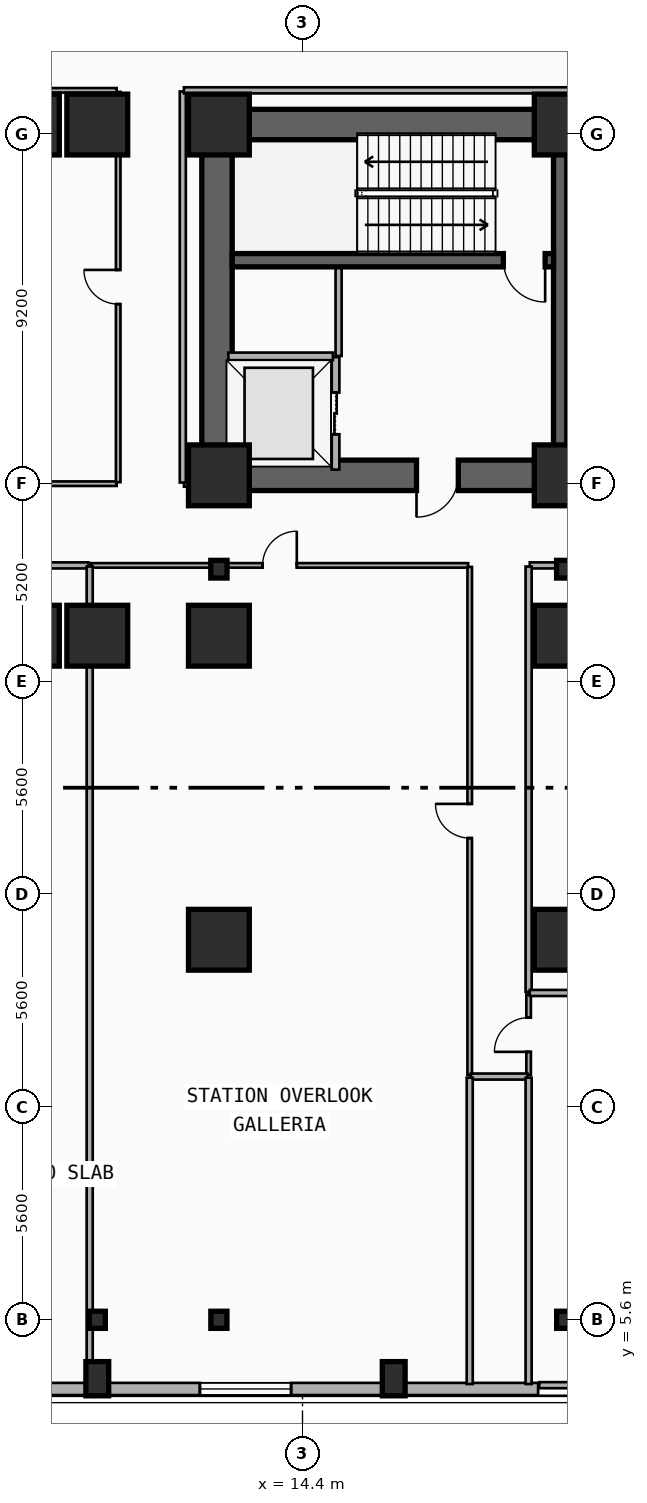
"""IFC4 building model, lengths in metres.
Left out: names, types, materials, properties, quantities, classifications, styles, units other than length and angle.
Written with IfcOpenShell. Run it as: python <this file> out.ifc"""

import sys

from ifc_helpers import new_model, si_unit, direction, frame, frame_2d, origin, origin_2d, place, context, subcontext, project, spatial, rectangle, i_section, extrude, element, fill, save


model = new_model("IFC4")
c1 = context("Model", 3, precision=1e-05, world=origin(), true_north=direction((0.0, 1.0)))
c2 = subcontext(c1, "Body", "Model", "MODEL_VIEW")
j1 = project(units=[si_unit("LENGTHUNIT", "METRE"), si_unit("PLANEANGLEUNIT", "RADIAN")], contexts=[c1])
p1 = place(None, origin())
s1 = spatial("IfcSite", under=j1, at=p1, CompositionType="ELEMENT")
p2 = place(p1, origin())
s2 = spatial("IfcBuilding", under=s1, at=p2, CompositionType="ELEMENT")
p3 = place(p2, frame((0.0, 0.0, 5.4)))
s3 = spatial("IfcBuildingStorey", under=s2, at=p3, CompositionType="ELEMENT", Elevation=5.4)
p4 = place(p3, frame((12.15, 37.05, 0.0), z_axis=(0.0, 0.0, 1.0), x_axis=(1.0, 0.0, 0.0)))
e1 = element("IfcWall", 1, at=p4, inside=s3, PredefinedType="SHEAR", context=c2, shape_type="SweptSolid", body=[
    extrude(rectangle(XDim=33.23, YDim=0.8, at=frame_2d((16.615, 0.0))), origin(), (0.0, 0.0, 1.0), 5.0),
])
p5 = place(p3, frame((21.18, 27.82, 0.0), z_axis=(0.0, 0.0, 1.0), x_axis=(-1.0, 0.0, 0.0)))
e2 = element("IfcWall", 2, at=p5, inside=s3, PredefinedType="SHEAR", context=c2, shape_type="SweptSolid", body=[
    extrude(rectangle(XDim=9.03, YDim=0.8, at=frame_2d((4.515, 0.0))), origin(), (0.0, 0.0, 1.0), 5.0),
])
p6 = place(p5, frame((2.68, 0.0, 0.0)))
e3 = element("IfcOpeningElement", 3, at=p6, cuts=e2, PredefinedType="OPENING", context=c2, shape_type="SweptSolid", body=[
    extrude(rectangle(XDim=1.1, YDim=2.15, at=frame_2d((0.55, 1.075))), frame((0.0, 0.41, 0.0), z_axis=(0.0, -1.0, 0.0), x_axis=(1.0, 0.0, 0.0)), (0.0, 0.0, 1.0), 0.82),
])
p7 = place(p3, frame((33.15, 27.82, 0.0), z_axis=(0.0, 0.0, 1.0), x_axis=(-1.0, 0.0, 0.0)))
e4 = element("IfcWall", 4, at=p7, inside=s3, PredefinedType="SHEAR", context=c2, shape_type="SweptSolid", body=[
    extrude(rectangle(XDim=11.97, YDim=0.8, at=frame_2d((5.985, 0.0))), origin(), (0.0, 0.0, 1.0), 5.0),
])
p8 = place(p7, frame((6.1, 0.0, 0.0)))
e5 = element("IfcOpeningElement", 5, at=p8, cuts=e4, PredefinedType="OPENING", context=c2, shape_type="SweptSolid", body=[
    extrude(rectangle(XDim=1.6, YDim=2.2, at=frame_2d((0.8, 1.1))), frame((0.0, 0.41, 0.0), z_axis=(0.0, -1.0, 0.0), x_axis=(1.0, 0.0, 0.0)), (0.0, 0.0, 1.0), 0.82),
])
p9 = place(p3, frame((12.15, 28.22, 0.0), z_axis=(0.0, 0.0, 1.0), x_axis=(0.0, 1.0, 0.0)))
e6 = element("IfcWall", 6, at=p9, inside=s3, PredefinedType="SHEAR", context=c2, shape_type="SweptSolid", body=[
    extrude(rectangle(XDim=8.43, YDim=0.8, at=frame_2d((4.215, 0.0))), origin(), (0.0, 0.0, 1.0), 5.0),
])
p10 = place(p3, frame((21.18, 28.22, 0.0), z_axis=(0.0, 0.0, 1.0), x_axis=(0.0, 1.0, 0.0)))
e7 = element("IfcWall", 7, at=p10, inside=s3, PredefinedType="SHEAR", context=c2, shape_type="SweptSolid", body=[
    extrude(rectangle(XDim=8.43, YDim=0.35, at=frame_2d((4.215, 0.0))), origin(), (0.0, 0.0, 1.0), 5.0),
])
p11 = place(p3, frame((21.005, 33.48, 0.0), z_axis=(0.0, 0.0, 1.0), x_axis=(-1.0, 0.0, 0.0)))
e8 = element("IfcWall", 8, at=p11, inside=s3, PredefinedType="SHEAR", context=c2, shape_type="SweptSolid", body=[
    extrude(rectangle(XDim=8.455, YDim=0.35, at=frame_2d((4.228, 0.0))), origin(), (0.0, 0.0, 1.0), 5.0),
])
p12 = place(p11, frame((0.22, 0.0, 0.0)))
e9 = element("IfcOpeningElement", 9, at=p12, cuts=e8, PredefinedType="OPENING", context=c2, shape_type="SweptSolid", body=[
    extrude(rectangle(XDim=1.1, YDim=2.15, at=frame_2d((0.55, 1.075))), frame((0.0, 0.185, 0.0), z_axis=(0.0, -1.0, 0.0), x_axis=(1.0, 0.0, 0.0)), (0.0, 0.0, 1.0), 0.37),
])
for number, where, z_axis, x_axis in (
    (10, (12.2, 27.82, 0.0), (0.0, 0.0, 1.0), (1.0, 0.0, 0.0)),
    (11, (12.2, 37.05, 0.0), (0.0, 0.0, 1.0), (1.0, 0.0, 0.0)),
    (12, (21.3, 27.82, 0.0), (0.0, 0.0, 1.0), (1.0, 0.0, 0.0)),
    (13, (21.3, 37.05, 0.0), (0.0, 0.0, 1.0), (1.0, 0.0, 0.0)),
):
    element("IfcColumn", number, at=place(p3, frame(where, z_axis=z_axis, x_axis=x_axis)), inside=s3, PredefinedType="COLUMN", context=c2, shape_type="SweptSolid", body=[
        extrude(rectangle(XDim=1.6, YDim=1.6, at=origin_2d()), origin(), (0.0, 0.0, 1.0), 5.0),
    ])
for number, where, z_axis, x_axis in (
    (14, (12.2, 25.35, 0.0), (0.0, 0.0, 1.0), (1.0, 0.0, 0.0)),
    (15, (21.3, 25.35, 0.0), (0.0, 0.0, 1.0), (1.0, 0.0, 0.0)),
):
    element("IfcColumn", number, at=place(p3, frame(where, z_axis=z_axis, x_axis=x_axis)), inside=s3, PredefinedType="COLUMN", context=c2, shape_type="SweptSolid", body=[
        extrude(i_section(OverallWidth=0.428, OverallDepth=0.465, WebThickness=0.045, FlangeThickness=0.073, FilletRadius=0.015, at=origin_2d()), origin(), (0.0, 0.0, 1.0), 5.0),
    ])
for number, where, z_axis, x_axis in (
    (16, (7.2, 23.6, 0.0), (0.0, 0.0, 1.0), (1.0, 0.0, 0.0)),
    (17, (7.2, 37.05, 0.0), (0.0, 0.0, 1.0), (1.0, 0.0, 0.0)),
):
    element("IfcColumn", number, at=place(p3, frame(where, z_axis=z_axis, x_axis=x_axis)), inside=s3, PredefinedType="COLUMN", context=c2, shape_type="SweptSolid", body=[
        extrude(rectangle(XDim=1.6, YDim=1.6, at=origin_2d()), origin(), (0.0, 0.0, 1.0), 5.0),
    ])
p13 = place(p3, frame((9.0, 5.6, 0.0), z_axis=(0.0, 0.0, 1.0), x_axis=(1.0, 0.0, 0.0)))
e18 = element("IfcColumn", 18, at=p13, inside=s3, PredefinedType="COLUMN", context=c2, shape_type="SweptSolid", body=[
    extrude(i_section(OverallWidth=0.424, OverallDepth=0.45, WebThickness=0.041, FlangeThickness=0.065, FilletRadius=0.015, at=origin_2d()), origin(), (0.0, 0.0, 1.0), 5.0),
])
for number, where, z_axis, x_axis in (
    (19, (9.0, 23.6, 0.0), (0.0, 0.0, 1.0), (1.0, 0.0, 0.0)),
    (20, (9.0, 37.05, 0.0), (0.0, 0.0, 1.0), (1.0, 0.0, 0.0)),
):
    element("IfcColumn", number, at=place(p3, frame(where, z_axis=z_axis, x_axis=x_axis)), inside=s3, PredefinedType="COLUMN", context=c2, shape_type="SweptSolid", body=[
        extrude(rectangle(XDim=1.6, YDim=1.6, at=origin_2d()), origin(), (0.0, 0.0, 1.0), 5.0),
    ])
p14 = place(p3, frame((12.2, 5.6, 0.0), z_axis=(0.0, 0.0, 1.0), x_axis=(1.0, 0.0, 0.0)))
e21 = element("IfcColumn", 21, at=p14, inside=s3, PredefinedType="COLUMN", context=c2, shape_type="SweptSolid", body=[
    extrude(i_section(OverallWidth=0.424, OverallDepth=0.45, WebThickness=0.041, FlangeThickness=0.065, FilletRadius=0.015, at=origin_2d()), origin(), (0.0, 0.0, 1.0), 5.0),
])
for number, where, z_axis, x_axis in (
    (22, (12.2, 15.6, 0.0), (0.0, 0.0, 1.0), (1.0, 0.0, 0.0)),
    (23, (12.2, 23.6, 0.0), (0.0, 0.0, 1.0), (1.0, 0.0, 0.0)),
):
    element("IfcColumn", number, at=place(p3, frame(where, z_axis=z_axis, x_axis=x_axis)), inside=s3, PredefinedType="COLUMN", context=c2, shape_type="SweptSolid", body=[
        extrude(rectangle(XDim=1.6, YDim=1.6, at=origin_2d()), origin(), (0.0, 0.0, 1.0), 5.0),
    ])
p15 = place(p3, frame((21.3, 5.6, 0.0), z_axis=(0.0, 0.0, 1.0), x_axis=(1.0, 0.0, 0.0)))
e24 = element("IfcColumn", 24, at=p15, inside=s3, PredefinedType="COLUMN", context=c2, shape_type="SweptSolid", body=[
    extrude(i_section(OverallWidth=0.424, OverallDepth=0.45, WebThickness=0.041, FlangeThickness=0.065, FilletRadius=0.015, at=origin_2d()), origin(), (0.0, 0.0, 1.0), 5.0),
])
for number, where, z_axis, x_axis in (
    (25, (21.3, 15.6, 0.0), (0.0, 0.0, 1.0), (1.0, 0.0, 0.0)),
    (26, (21.3, 23.6, 0.0), (0.0, 0.0, 1.0), (1.0, 0.0, 0.0)),
):
    element("IfcColumn", number, at=place(p3, frame(where, z_axis=z_axis, x_axis=x_axis)), inside=s3, PredefinedType="COLUMN", context=c2, shape_type="SweptSolid", body=[
        extrude(rectangle(XDim=1.6, YDim=1.6, at=origin_2d()), origin(), (0.0, 0.0, 1.0), 5.0),
    ])
for number, where, z_axis, x_axis in (
    (27, (9.0, 4.05, 0.0), (0.0, 0.0, 1.0), (1.0, 0.0, 0.0)),
    (28, (16.8, 4.05, 0.0), (0.0, 0.0, 1.0), (1.0, 0.0, 0.0)),
):
    element("IfcColumn", number, at=place(p3, frame(where, z_axis=z_axis, x_axis=x_axis)), inside=s3, PredefinedType="PILASTER", context=c2, shape_type="SweptSolid", body=[
        extrude(rectangle(XDim=0.6, YDim=0.9, at=origin_2d()), origin(), (0.0, 0.0, 1.0), 5.0),
    ])
p16 = place(p3, frame((20.6, 3.78, 0.0), z_axis=(0.0, 0.0, 1.0), x_axis=(-1.0, 0.0, 0.0)))
e29 = element("IfcWall", 29, at=p16, inside=s3, PredefinedType="SOLIDWALL", context=c2, shape_type="SweptSolid", body=[
    extrude(rectangle(XDim=17.0, YDim=0.32, at=frame_2d((8.5, 0.0))), origin(), (0.0, 0.0, 1.0), 4.03),
])
p17 = place(p16, frame((6.5, 0.0, 0.9)))
e30 = element("IfcOpeningElement", 30, at=p17, cuts=e29, PredefinedType="OPENING", context=c2, shape_type="SweptSolid", body=[
    extrude(rectangle(XDim=2.4, YDim=1.8, at=frame_2d((1.2, 0.9))), frame((0.0, 0.17, 0.0), z_axis=(0.0, -1.0, 0.0), x_axis=(1.0, 0.0, 0.0)), (0.0, 0.0, 1.0), 0.34),
])
p18 = place(p3, frame((15.27, 27.97, 0.0), z_axis=(0.0, 0.0, 1.0), x_axis=(0.0, 1.0, 0.0)))
e31 = element("IfcWall", 31, at=p18, inside=s3, PredefinedType="PARTITIONING", context=c2, shape_type="SweptSolid", body=[
    extrude(rectangle(XDim=2.96, YDim=0.2, at=frame_2d((1.48, 0.0))), origin(), (0.0, 0.0, 1.0), 3.672),
])
p19 = place(p18, frame((0.93, 0.0, 0.0)))
e32 = element("IfcOpeningElement", 32, at=p19, cuts=e31, PredefinedType="OPENING", context=c2, shape_type="SweptSolid", body=[
    extrude(rectangle(XDim=1.1, YDim=2.15, at=frame_2d((0.55, 1.075))), frame((0.0, 0.11, 0.0), z_axis=(0.0, -1.0, 0.0), x_axis=(1.0, 0.0, 0.0)), (0.0, 0.0, 1.0), 0.22),
])
p20 = place(p3, frame((12.45, 30.95, 0.0), z_axis=(0.0, 0.0, 1.0), x_axis=(1.0, 0.0, 0.0)))
e33 = element("IfcWall", 33, at=p20, inside=s3, PredefinedType="PARTITIONING", context=c2, shape_type="SweptSolid", body=[
    extrude(rectangle(XDim=2.75, YDim=0.2, at=frame_2d((1.375, 0.0))), origin(), (0.0, 0.0, 1.0), 3.672),
])
p21 = place(p3, frame((0.28, 27.6, 0.0), z_axis=(0.0, 0.0, 1.0), x_axis=(1.0, 0.0, 0.0)))
e34 = element("IfcWall", 34, at=p21, inside=s3, PredefinedType="PARTITIONING", context=c2, shape_type="SweptSolid", body=[
    extrude(rectangle(XDim=9.23, YDim=0.12, at=frame_2d((4.615, 0.0))), origin(), (0.0, 0.0, 1.0), 4.7),
])
p22 = place(p21, frame((4.165, 0.0, 0.0)))
e35 = element("IfcOpeningElement", 35, at=p22, cuts=e34, PredefinedType="OPENING", context=c2, shape_type="SweptSolid", body=[
    extrude(rectangle(XDim=0.9, YDim=2.1, at=frame_2d((0.45, 1.05))), frame((0.0, 0.07, 0.0), z_axis=(0.0, -1.0, 0.0), x_axis=(1.0, 0.0, 0.0)), (0.0, 0.0, 1.0), 0.14),
])
p23 = place(p3, frame((8.84, 25.45, 0.0), z_axis=(0.0, 0.0, 1.0), x_axis=(1.0, 0.0, 0.0)))
e36 = element("IfcWall", 36, at=p23, inside=s3, PredefinedType="PARTITIONING", context=c2, shape_type="SweptSolid", body=[
    extrude(rectangle(XDim=9.92, YDim=0.12, at=frame_2d((4.96, 0.0))), origin(), (0.0, 0.0, 1.0), 3.672),
])
p24 = place(p23, frame((4.51, 0.0, 0.0)))
e37 = element("IfcOpeningElement", 37, at=p24, cuts=e36, PredefinedType="OPENING", context=c2, shape_type="SweptSolid", body=[
    extrude(rectangle(XDim=0.9, YDim=2.1, at=frame_2d((0.45, 1.05))), frame((0.0, 0.07, 0.0), z_axis=(0.0, -1.0, 0.0), x_axis=(1.0, 0.0, 0.0)), (0.0, 0.0, 1.0), 0.14),
])
p25 = place(p3, frame((9.55, 27.64, 0.0), z_axis=(0.0, 0.0, 1.0), x_axis=(0.0, 1.0, 0.0)))
e38 = element("IfcWall", 38, at=p25, inside=s3, PredefinedType="PARTITIONING", context=c2, shape_type="SweptSolid", body=[
    extrude(rectangle(XDim=10.27, YDim=0.12, at=frame_2d((5.135, 0.0))), origin(), (0.0, 0.0, 1.0), 4.7),
])
p26 = place(p25, frame((4.685, 0.0, 0.0)))
e39 = element("IfcOpeningElement", 39, at=p26, cuts=e38, PredefinedType="OPENING", context=c2, shape_type="SweptSolid", body=[
    extrude(rectangle(XDim=0.9, YDim=2.1, at=frame_2d((0.45, 1.05))), frame((0.0, 0.07, 0.0), z_axis=(0.0, -1.0, 0.0), x_axis=(1.0, 0.0, 0.0)), (0.0, 0.0, 1.0), 0.14),
])
p27 = place(p3, frame((1.84, 37.95, 0.0), z_axis=(0.0, 0.0, 1.0), x_axis=(1.0, 0.0, 0.0)))
e40 = element("IfcWall", 40, at=p27, inside=s3, PredefinedType="PARTITIONING", context=c2, shape_type="SweptSolid", body=[
    extrude(rectangle(XDim=7.67, YDim=0.12, at=frame_2d((3.835, 0.0))), origin(), (0.0, 0.0, 1.0), 4.7),
])
p28 = place(p27, frame((3.385, 0.0, 0.0)))
e41 = element("IfcOpeningElement", 41, at=p28, cuts=e40, PredefinedType="OPENING", context=c2, shape_type="SweptSolid", body=[
    extrude(rectangle(XDim=0.9, YDim=2.1, at=frame_2d((0.45, 1.05))), frame((0.0, 0.07, 0.0), z_axis=(0.0, -1.0, 0.0), x_axis=(1.0, 0.0, 0.0)), (0.0, 0.0, 1.0), 0.14),
])
p29 = place(p3, frame((18.8, 12.04, 0.0), z_axis=(0.0, 0.0, 1.0), x_axis=(0.0, 1.0, 0.0)))
e42 = element("IfcWall", 42, at=p29, inside=s3, PredefinedType="PARTITIONING", context=c2, shape_type="SweptSolid", body=[
    extrude(rectangle(XDim=13.37, YDim=0.12, at=frame_2d((6.685, 0.0))), origin(), (0.0, 0.0, 1.0), 3.672),
])
p30 = place(p29, frame((6.235, 0.0, 0.0)))
e43 = element("IfcOpeningElement", 43, at=p30, cuts=e42, PredefinedType="OPENING", context=c2, shape_type="SweptSolid", body=[
    extrude(rectangle(XDim=0.9, YDim=2.1, at=frame_2d((0.45, 1.05))), frame((0.0, 0.07, 0.0), z_axis=(0.0, -1.0, 0.0), x_axis=(1.0, 0.0, 0.0)), (0.0, 0.0, 1.0), 0.14),
])
p31 = place(p3, frame((20.35, 12.04, 0.0), z_axis=(0.0, 0.0, 1.0), x_axis=(0.0, 1.0, 0.0)))
e44 = element("IfcWall", 44, at=p31, inside=s3, PredefinedType="PARTITIONING", context=c2, shape_type="SweptSolid", body=[
    extrude(rectangle(XDim=2.12, YDim=0.12, at=frame_2d((1.06, 0.0))), origin(), (0.0, 0.0, 1.0), 4.32),
])
p32 = place(p31, frame((0.61, 0.0, 0.0)))
e45 = element("IfcOpeningElement", 45, at=p32, cuts=e44, PredefinedType="OPENING", context=c2, shape_type="SweptSolid", body=[
    extrude(rectangle(XDim=0.9, YDim=2.1, at=frame_2d((0.45, 1.05))), frame((0.0, 0.07, 0.0), z_axis=(0.0, -1.0, 0.0), x_axis=(1.0, 0.0, 0.0)), (0.0, 0.0, 1.0), 0.14),
])
p33 = place(p3, frame((15.35, 30.96, 0.0), z_axis=(0.0, 0.0, 1.0), x_axis=(0.0, 1.0, 0.0)))
e46 = element("IfcWall", 46, at=p33, inside=s3, PredefinedType="PARTITIONING", context=c2, shape_type="SweptSolid", body=[
    extrude(rectangle(XDim=2.31, YDim=0.16, at=frame_2d((1.155, 0.0))), origin(), (0.0, 0.0, 1.0), 4.7),
])
p34 = place(p3, frame((0.31, 25.45, 0.0), z_axis=(0.0, 0.0, 1.0), x_axis=(1.0, 0.0, 0.0)))
e47 = element("IfcWall", 47, at=p34, inside=s3, PredefinedType="PARTITIONING", context=c2, shape_type="SweptSolid", body=[
    extrude(rectangle(XDim=8.46, YDim=0.16, at=frame_2d((4.23, 0.0))), origin(), (0.0, 0.0, 1.0), 4.7),
])
p35 = place(p3, frame((20.38, 25.45, 0.0), z_axis=(0.0, 0.0, 1.0), x_axis=(1.0, 0.0, 0.0)))
e48 = element("IfcWall", 48, at=p35, inside=s3, PredefinedType="PARTITIONING", context=c2, shape_type="SweptSolid", body=[
    extrude(rectangle(XDim=15.94, YDim=0.16, at=frame_2d((7.97, 0.0))), origin(), (0.0, 0.0, 1.0), 3.672),
])
p36 = place(p3, frame((11.28, 27.6, 0.0), z_axis=(0.0, 0.0, 1.0), x_axis=(1.0, 0.0, 0.0)))
e49 = element("IfcWall", 49, at=p36, inside=s3, PredefinedType="PARTITIONING", context=c2, shape_type="SweptSolid", body=[
    extrude(rectangle(XDim=0.84, YDim=0.16, at=frame_2d((0.42, 0.0))), origin(), (0.0, 0.0, 1.0), 3.672),
])
p37 = place(p3, frame((11.25, 27.63, 0.0), z_axis=(0.0, 0.0, 1.0), x_axis=(0.0, 1.0, 0.0)))
e50 = element("IfcWall", 50, at=p37, inside=s3, PredefinedType="PARTITIONING", context=c2, shape_type="SweptSolid", body=[
    extrude(rectangle(XDim=10.29, YDim=0.16, at=frame_2d((5.145, 0.0))), origin(), (0.0, 0.0, 1.0), 4.7),
])
p38 = place(p3, frame((11.28, 37.95, 0.0), z_axis=(0.0, 0.0, 1.0), x_axis=(1.0, 0.0, 0.0)))
e51 = element("IfcWall", 51, at=p38, inside=s3, PredefinedType="PARTITIONING", context=c2, shape_type="SweptSolid", body=[
    extrude(rectangle(XDim=35.04, YDim=0.16, at=frame_2d((17.52, 0.0))), origin(), (0.0, 0.0, 1.0), 4.03),
])
p39 = place(p3, frame((18.83, 12.0, 0.0), z_axis=(0.0, 0.0, 1.0), x_axis=(1.0, 0.0, 0.0)))
e52 = element("IfcWall", 52, at=p39, inside=s3, PredefinedType="PARTITIONING", context=c2, shape_type="SweptSolid", body=[
    extrude(rectangle(XDim=1.49, YDim=0.16, at=frame_2d((0.745, 0.0))), origin(), (0.0, 0.0, 1.0), 4.32),
])
p40 = place(p3, frame((20.35, 14.23, 0.0), z_axis=(0.0, 0.0, 1.0), x_axis=(0.0, 1.0, 0.0)))
e53 = element("IfcWall", 53, at=p40, inside=s3, PredefinedType="PARTITIONING", context=c2, shape_type="SweptSolid", body=[
    extrude(rectangle(XDim=11.19, YDim=0.16, at=frame_2d((5.595, 0.0))), origin(), (0.0, 0.0, 1.0), 3.672),
])
p41 = place(p3, frame((8.8, 3.91, 0.0), z_axis=(0.0, 0.0, 1.0), x_axis=(0.0, 1.0, 0.0)))
e54 = element("IfcWall", 54, at=p41, inside=s3, PredefinedType="PARTITIONING", context=c2, shape_type="SweptSolid", body=[
    extrude(rectangle(XDim=21.51, YDim=0.16, at=frame_2d((10.755, 0.0))), origin(), (0.0, 0.0, 1.0), 4.03),
])
p42 = place(p3, frame((18.8, 3.91, 0.0), z_axis=(0.0, 0.0, 1.0), x_axis=(0.0, 1.0, 0.0)))
e55 = element("IfcWall", 55, at=p42, inside=s3, PredefinedType="PARTITIONING", context=c2, shape_type="SweptSolid", body=[
    extrude(rectangle(XDim=8.06, YDim=0.16, at=frame_2d((4.03, 0.0))), origin(), (0.0, 0.0, 1.0), 4.03),
])
p43 = place(p3, frame((20.63, 3.88, 0.0), z_axis=(0.0, 0.0, 1.0), x_axis=(1.0, 0.0, 0.0)))
e56 = element("IfcWall", 56, at=p43, inside=s3, PredefinedType="PARTITIONING", context=c2, shape_type="SweptSolid", body=[
    extrude(rectangle(XDim=1.44, YDim=0.16, at=frame_2d((0.72, 0.0))), origin(), (0.0, 0.0, 1.0), 4.03),
])
p44 = place(p3, frame((20.38, 14.2, 0.0), z_axis=(0.0, 0.0, 1.0), x_axis=(1.0, 0.0, 0.0)))
e57 = element("IfcWall", 57, at=p44, inside=s3, PredefinedType="PARTITIONING", context=c2, shape_type="SweptSolid", body=[
    extrude(rectangle(XDim=15.94, YDim=0.16, at=frame_2d((7.97, 0.0))), origin(), (0.0, 0.0, 1.0), 3.672),
])
p45 = place(p3, frame((20.35, 3.91, 0.0), z_axis=(0.0, 0.0, 1.0), x_axis=(0.0, 1.0, 0.0)))
e58 = element("IfcWall", 58, at=p45, inside=s3, PredefinedType="PARTITIONING", context=c2, shape_type="SweptSolid", body=[
    extrude(rectangle(XDim=8.06, YDim=0.16, at=frame_2d((4.03, 0.0))), origin(), (0.0, 0.0, 1.0), 4.03),
])
p46 = place(p17, origin())
e59 = element("IfcWindow", 59, at=p46, inside=s3, PartitioningType="SINGLE_PANEL", PredefinedType="WINDOW", context=c2, shape_type="SweptSolid", body=[
    extrude(rectangle(XDim=2.4, YDim=1.8, at=frame_2d((1.2, 0.9))), frame((0.0, 0.03, 0.0), z_axis=(0.0, -1.0, 0.0), x_axis=(1.0, 0.0, 0.0)), (0.0, 0.0, 1.0), 0.06),
])
fill(e30, e59)
p47 = place(p19, origin())
e60 = element("IfcDoor", 60, at=p47, inside=s3, OperationType="DOUBLE_DOOR_SLIDING", PredefinedType="DOOR", context=c2, shape_type="SweptSolid", body=[
    extrude(rectangle(XDim=1.1, YDim=2.15, at=frame_2d((0.55, 1.075))), frame((0.0, 0.025, 0.0), z_axis=(0.0, -1.0, 0.0), x_axis=(1.0, 0.0, 0.0)), (0.0, 0.0, 1.0), 0.05),
])
fill(e32, e60)
p48 = place(p12, origin())
e61 = element("IfcDoor", 61, at=p48, inside=s3, OperationType="SINGLE_SWING_LEFT", PredefinedType="DOOR", context=c2, shape_type="SweptSolid", body=[
    extrude(rectangle(XDim=1.1, YDim=2.15, at=frame_2d((0.55, 1.075))), frame((0.0, 0.025, 0.0), z_axis=(0.0, -1.0, 0.0), x_axis=(1.0, 0.0, 0.0)), (0.0, 0.0, 1.0), 0.05),
])
fill(e9, e61)
p49 = place(p6, origin())
e62 = element("IfcDoor", 62, at=p49, inside=s3, OperationType="SINGLE_SWING_RIGHT", PredefinedType="DOOR", context=c2, shape_type="SweptSolid", body=[
    extrude(rectangle(XDim=1.1, YDim=2.15, at=frame_2d((0.55, 1.075))), frame((0.0, 0.025, 0.0), z_axis=(0.0, -1.0, 0.0), x_axis=(1.0, 0.0, 0.0)), (0.0, 0.0, 1.0), 0.05),
])
fill(e3, e62)
p50 = place(p24, origin())
e63 = element("IfcDoor", 63, at=p50, inside=s3, OperationType="SINGLE_SWING_RIGHT", PredefinedType="DOOR", context=c2, shape_type="SweptSolid", body=[
    extrude(rectangle(XDim=0.9, YDim=2.1, at=frame_2d((0.45, 1.05))), frame((0.0, 0.025, 0.0), z_axis=(0.0, -1.0, 0.0), x_axis=(1.0, 0.0, 0.0)), (0.0, 0.0, 1.0), 0.05),
])
fill(e37, e63)
p51 = place(p26, origin())
e64 = element("IfcDoor", 64, at=p51, inside=s3, OperationType="SINGLE_SWING_RIGHT", PredefinedType="DOOR", context=c2, shape_type="SweptSolid", body=[
    extrude(rectangle(XDim=0.9, YDim=2.1, at=frame_2d((0.45, 1.05))), frame((0.0, 0.025, 0.0), z_axis=(0.0, -1.0, 0.0), x_axis=(1.0, 0.0, 0.0)), (0.0, 0.0, 1.0), 0.05),
])
fill(e39, e64)
p52 = place(p30, origin())
e65 = element("IfcDoor", 65, at=p52, inside=s3, OperationType="SINGLE_SWING_RIGHT", PredefinedType="DOOR", context=c2, shape_type="SweptSolid", body=[
    extrude(rectangle(XDim=0.9, YDim=2.1, at=frame_2d((0.45, 1.05))), frame((0.0, 0.025, 0.0), z_axis=(0.0, -1.0, 0.0), x_axis=(1.0, 0.0, 0.0)), (0.0, 0.0, 1.0), 0.05),
])
fill(e43, e65)
p53 = place(p32, origin())
e66 = element("IfcDoor", 66, at=p53, inside=s3, OperationType="SINGLE_SWING_LEFT", PredefinedType="DOOR", context=c2, shape_type="SweptSolid", body=[
    extrude(rectangle(XDim=0.9, YDim=2.1, at=frame_2d((0.45, 1.05))), frame((0.0, 0.025, 0.0), z_axis=(0.0, -1.0, 0.0), x_axis=(1.0, 0.0, 0.0)), (0.0, 0.0, 1.0), 0.05),
])
fill(e45, e66)
save(model, sys.argv[1])
